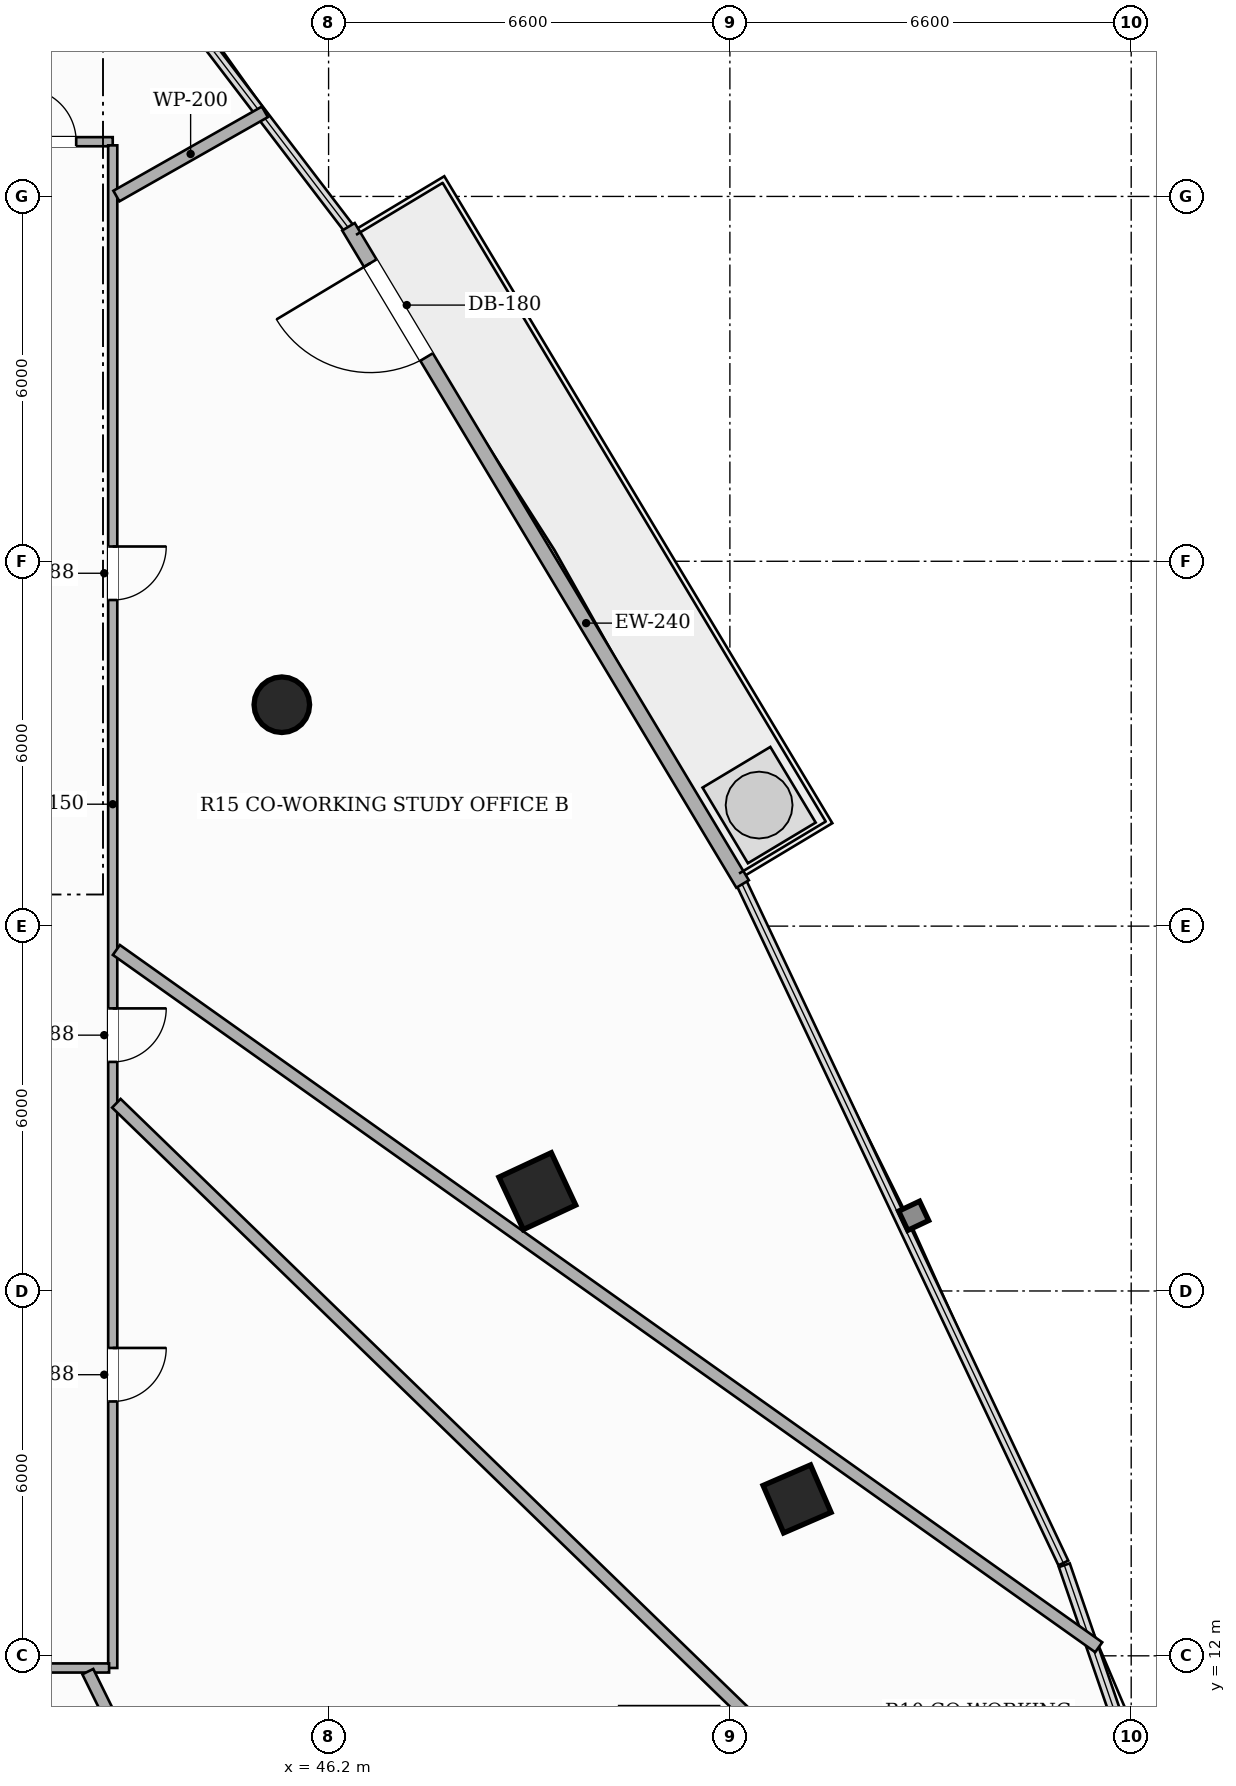
"""IFC4 building model, lengths in metres.
Left out: names, types, materials, properties, quantities, classifications, styles, units other than length and angle.
Written with IfcOpenShell. Run it as: python <this file> out.ifc"""

import sys

from ifc_helpers import new_model, si_unit, direction, frame, frame_2d, origin, origin_2d, place, context, subcontext, project, spatial, rectangle, hollow_rectangle, hollow_circle, extrude, element, fill, save


model = new_model("IFC4")
c1 = context("Model", 3, precision=1e-05, world=origin(), true_north=direction((0.0, 1.0)))
c2 = subcontext(c1, "Body", "Model", "MODEL_VIEW")
j1 = project(units=[si_unit("LENGTHUNIT", "METRE"), si_unit("PLANEANGLEUNIT", "RADIAN")], contexts=[c1])
p1 = place(None, origin())
s1 = spatial("IfcSite", under=j1, at=p1, CompositionType="ELEMENT")
p2 = place(p1, origin())
s2 = spatial("IfcBuilding", under=s1, at=p2, CompositionType="ELEMENT")
p3 = place(p2, frame((0.0, 0.0, 70.85)))
s3 = spatial("IfcBuildingStorey", under=s2, at=p3, CompositionType="ELEMENT", Elevation=70.85)
p4 = place(p3, frame((49.633, 19.642, 0.0), z_axis=(0.0, 0.0, 1.0), x_axis=(-0.422618261741, 0.906307787037, 0.0)))
e1 = element("IfcColumn", 1, at=p4, inside=s3, PredefinedType="COLUMN", context=c2, shape_type="SweptSolid", body=[
    extrude(hollow_rectangle(XDim=0.95, YDim=0.95, WallThickness=0.032, at=origin_2d()), origin(), (0.0, 0.0, 1.0), 3.3),
])
p5 = place(p3, frame((45.431, 27.641, 0.0), z_axis=(0.0, 0.0, 1.0), x_axis=(1.0, 0.0, 0.0)))
e2 = element("IfcColumn", 2, at=p5, inside=s3, PredefinedType="COLUMN", context=c2, shape_type="SweptSolid", body=[
    extrude(hollow_circle(Radius=0.457, WallThickness=0.025, at=origin_2d()), origin(), (0.0, 0.0, 1.0), 3.3),
])
p6 = place(p3, frame((53.905, 14.58, 0.0), z_axis=(0.0, 0.0, 1.0), x_axis=(-0.397147890635, 0.917754625684, 0.0)))
e3 = element("IfcColumn", 3, at=p6, inside=s3, PredefinedType="COLUMN", context=c2, shape_type="SweptSolid", body=[
    extrude(hollow_rectangle(XDim=0.85, YDim=0.85, WallThickness=0.028, at=origin_2d()), origin(), (0.0, 0.0, 1.0), 3.3),
])
p7 = place(p3, frame((53.009, 24.693, 0.0), z_axis=(0.0, 0.0, 1.0), x_axis=(-0.514333361126, 0.857590341382, 0.0)))
e4 = element("IfcWall", 4, at=p7, inside=s3, PredefinedType="SOLIDWALL", context=c2, shape_type="SweptSolid", body=[
    extrude(rectangle(XDim=12.603, YDim=0.24, at=frame_2d((6.301, 0.0))), origin(), (0.0, 0.0, 1.0), 2.624),
])
p8 = place(p7, frame((10.105, 0.0, 0.0)))
e5 = element("IfcOpeningElement", 5, at=p8, cuts=e4, PredefinedType="OPENING", context=c2, shape_type="SweptSolid", body=[
    extrude(rectangle(XDim=1.8, YDim=2.2, at=frame_2d((0.9, 1.1))), frame((0.0, 0.13, 0.0), z_axis=(0.0, -1.0, 0.0), x_axis=(1.0, 0.0, 0.0)), (0.0, 0.0, 1.0), 0.26),
])
p9 = place(p3, frame((40.1, 36.9, 0.0), z_axis=(0.0, 0.0, 1.0), x_axis=(1.0, 0.0, 0.0)))
e6 = element("IfcWall", 6, at=p9, inside=s3, PredefinedType="PARTITIONING", context=c2, shape_type="SweptSolid", body=[
    extrude(rectangle(XDim=2.55, YDim=0.15, at=frame_2d((1.275, 0.0))), origin(), (0.0, 0.0, 1.0), 2.413),
])
p10 = place(p9, frame((1.069, 0.0, 0.0)))
e7 = element("IfcOpeningElement", 7, at=p10, cuts=e6, PredefinedType="OPENING", context=c2, shape_type="SweptSolid", body=[
    extrude(rectangle(XDim=0.88, YDim=2.1, at=frame_2d((0.44, 1.05))), frame((0.0, 0.085, 0.0), z_axis=(0.0, -1.0, 0.0), x_axis=(1.0, 0.0, 0.0)), (0.0, 0.0, 1.0), 0.17),
])
p11 = place(p3, frame((42.65, 36.84, 0.0), z_axis=(0.0, 0.0, 1.0), x_axis=(0.0, -1.0, 0.0)))
e8 = element("IfcWall", 8, at=p11, inside=s3, PredefinedType="PARTITIONING", context=c2, shape_type="SweptSolid", body=[
    extrude(rectangle(XDim=25.04, YDim=0.15, at=frame_2d((12.52, 0.0))), origin(), (0.0, 0.0, 1.0), 2.413),
])
p12 = place(p11, frame((6.597, 0.0, 0.0)))
e9 = element("IfcOpeningElement", 9, at=p12, cuts=e8, PredefinedType="OPENING", context=c2, shape_type="SweptSolid", body=[
    extrude(rectangle(XDim=0.88, YDim=2.1, at=frame_2d((0.44, 1.05))), frame((0.0, 0.085, 0.0), z_axis=(0.0, -1.0, 0.0), x_axis=(1.0, 0.0, 0.0)), (0.0, 0.0, 1.0), 0.17),
])
p13 = place(p11, frame((19.777, 0.0, 0.0)))
e10 = element("IfcOpeningElement", 10, at=p13, cuts=e8, PredefinedType="OPENING", context=c2, shape_type="SweptSolid", body=[
    extrude(rectangle(XDim=0.88, YDim=2.1, at=frame_2d((0.44, 1.05))), frame((0.0, 0.085, 0.0), z_axis=(0.0, -1.0, 0.0), x_axis=(1.0, 0.0, 0.0)), (0.0, 0.0, 1.0), 0.17),
])
p14 = place(p11, frame((14.193, 0.0, 0.0)))
e11 = element("IfcOpeningElement", 11, at=p14, cuts=e8, PredefinedType="OPENING", context=c2, shape_type="SweptSolid", body=[
    extrude(rectangle(XDim=0.88, YDim=2.1, at=frame_2d((0.44, 1.05))), frame((0.0, 0.085, 0.0), z_axis=(0.0, -1.0, 0.0), x_axis=(1.0, 0.0, 0.0)), (0.0, 0.0, 1.0), 0.17),
])
p15 = place(p3, frame((42.59, 11.8, 0.0), z_axis=(0.0, 0.0, 1.0), x_axis=(-1.0, 0.0, 0.0)))
e12 = element("IfcWall", 12, at=p15, inside=s3, PredefinedType="PARTITIONING", context=c2, shape_type="SweptSolid", body=[
    extrude(rectangle(XDim=19.24, YDim=0.15, at=frame_2d((9.62, 0.0))), origin(), (0.0, 0.0, 1.0), 2.669),
])
p16 = place(p15, frame((11.489, 0.0, 0.0)))
e13 = element("IfcOpeningElement", 13, at=p16, cuts=e12, PredefinedType="OPENING", context=c2, shape_type="SweptSolid", body=[
    extrude(rectangle(XDim=0.92, YDim=2.15, at=frame_2d((0.46, 1.075))), frame((0.0, 0.085, 0.0), z_axis=(0.0, -1.0, 0.0), x_axis=(1.0, 0.0, 0.0)), (0.0, 0.0, 1.0), 0.17),
])
p17 = place(p15, frame((3.787, 0.0, 0.0)))
e14 = element("IfcOpeningElement", 14, at=p17, cuts=e12, PredefinedType="OPENING", context=c2, shape_type="SweptSolid", body=[
    extrude(rectangle(XDim=0.92, YDim=2.15, at=frame_2d((0.46, 1.075))), frame((0.0, 0.085, 0.0), z_axis=(0.0, -1.0, 0.0), x_axis=(1.0, 0.0, 0.0)), (0.0, 0.0, 1.0), 0.17),
])
p18 = place(p3, frame((45.152, 37.391, 0.0), z_axis=(0.0, 0.0, 1.0), x_axis=(-0.86984931175, -0.4933175193, 0.0)))
e15 = element("IfcWall", 15, at=p18, inside=s3, PredefinedType="PARTITIONING", context=c2, shape_type="SweptSolid", body=[
    extrude(rectangle(XDim=2.808, YDim=0.2, at=frame_2d((1.404, 0.0))), origin(), (0.0, 0.0, 1.0), 2.619),
])
p19 = place(p3, frame((58.866, 12.141, 0.0), z_axis=(0.0, 0.0, 1.0), x_axis=(-0.815477500133, 0.578788775614, 0.0)))
e16 = element("IfcWall", 16, at=p19, inside=s3, PredefinedType="PARTITIONING", context=c2, shape_type="SweptSolid", body=[
    extrude(rectangle(XDim=19.812, YDim=0.2, at=frame_2d((9.906, 0.0))), origin(), (0.0, 0.0, 1.0), 2.413),
])
p20 = place(p3, frame((46.754, 2.576, 0.0), z_axis=(0.0, 0.0, 1.0), x_axis=(-0.441871352221, 0.897078429172, 0.0)))
e17 = element("IfcWall", 17, at=p20, inside=s3, PredefinedType="PARTITIONING", context=c2, shape_type="SweptSolid", body=[
    extrude(rectangle(XDim=10.215, YDim=0.2, at=frame_2d((5.108, 0.0))), origin(), (0.0, 0.0, 1.0), 2.413),
])
p21 = place(p3, frame((42.71, 21.087, 0.0), z_axis=(0.0, 0.0, 1.0), x_axis=(0.717996025824, -0.696047201633, 0.0)))
e18 = element("IfcWall", 18, at=p21, inside=s3, PredefinedType="PARTITIONING", context=c2, shape_type="SweptSolid", body=[
    extrude(rectangle(XDim=23.737, YDim=0.2, at=frame_2d((11.868, 0.0))), origin(), (0.0, 0.0, 1.0), 2.413),
])
p22 = place(p8, origin())
e19 = element("IfcDoor", 19, at=p22, inside=s3, OperationType="SINGLE_SWING_RIGHT", PredefinedType="DOOR", context=c2, shape_type="SweptSolid", body=[
    extrude(rectangle(XDim=1.8, YDim=2.2, at=frame_2d((0.9, 1.1))), frame((0.0, 0.025, 0.0), z_axis=(0.0, -1.0, 0.0), x_axis=(1.0, 0.0, 0.0)), (0.0, 0.0, 1.0), 0.05),
])
fill(e5, e19)
p23 = place(p10, origin())
e20 = element("IfcDoor", 20, at=p23, inside=s3, OperationType="SINGLE_SWING_LEFT", PredefinedType="DOOR", context=c2, shape_type="SweptSolid", body=[
    extrude(rectangle(XDim=0.88, YDim=2.1, at=frame_2d((0.44, 1.05))), frame((0.0, 0.025, 0.0), z_axis=(0.0, -1.0, 0.0), x_axis=(1.0, 0.0, 0.0)), (0.0, 0.0, 1.0), 0.05),
])
fill(e7, e20)
p24 = place(p12, origin())
e21 = element("IfcDoor", 21, at=p24, inside=s3, OperationType="SINGLE_SWING_LEFT", PredefinedType="DOOR", context=c2, shape_type="SweptSolid", body=[
    extrude(rectangle(XDim=0.88, YDim=2.1, at=frame_2d((0.44, 1.05))), frame((0.0, 0.025, 0.0), z_axis=(0.0, -1.0, 0.0), x_axis=(1.0, 0.0, 0.0)), (0.0, 0.0, 1.0), 0.05),
])
fill(e9, e21)
p25 = place(p13, origin())
e22 = element("IfcDoor", 22, at=p25, inside=s3, OperationType="SINGLE_SWING_LEFT", PredefinedType="DOOR", context=c2, shape_type="SweptSolid", body=[
    extrude(rectangle(XDim=0.88, YDim=2.1, at=frame_2d((0.44, 1.05))), frame((0.0, 0.025, 0.0), z_axis=(0.0, -1.0, 0.0), x_axis=(1.0, 0.0, 0.0)), (0.0, 0.0, 1.0), 0.05),
])
fill(e10, e22)
p26 = place(p14, origin())
e23 = element("IfcDoor", 23, at=p26, inside=s3, OperationType="SINGLE_SWING_LEFT", PredefinedType="DOOR", context=c2, shape_type="SweptSolid", body=[
    extrude(rectangle(XDim=0.88, YDim=2.1, at=frame_2d((0.44, 1.05))), frame((0.0, 0.025, 0.0), z_axis=(0.0, -1.0, 0.0), x_axis=(1.0, 0.0, 0.0)), (0.0, 0.0, 1.0), 0.05),
])
fill(e11, e23)
save(model, sys.argv[1])
